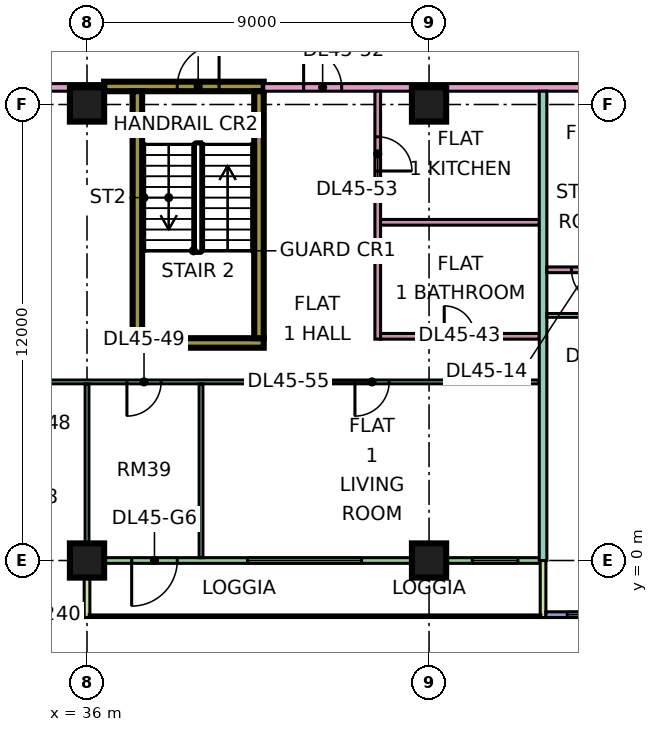
"""IFC4 building model, lengths in metres.
Left out: names, types, materials, properties, quantities, classifications, styles, units other than length and angle.
Written with IfcOpenShell. Run it as: python <this file> out.ifc"""

import sys

from ifc_helpers import new_model, si_unit, direction, frame, frame_2d, origin, origin_2d, place, context, subcontext, project, spatial, rectangle, extrude, element, fill, save


model = new_model("IFC4")
c1 = context("Model", 3, precision=1e-05, world=origin(), true_north=direction((0.0, 1.0)))
c2 = subcontext(c1, "Body", "Model", "MODEL_VIEW")
j1 = project(units=[si_unit("LENGTHUNIT", "METRE"), si_unit("PLANEANGLEUNIT", "RADIAN")], contexts=[c1])
p1 = place(None, origin())
s1 = spatial("IfcSite", under=j1, at=p1, CompositionType="ELEMENT")
p2 = place(p1, origin())
s2 = spatial("IfcBuilding", under=s1, at=p2, CompositionType="ELEMENT")
p3 = place(p2, frame((0.0, 0.0, 194.9)))
s3 = spatial("IfcBuildingStorey", under=s2, at=p3, CompositionType="ELEMENT", Elevation=194.9)
for number, where, z_axis, x_axis in (
    (1, (36.0, 0.0, 0.0), (0.0, 0.0, 1.0), (1.0, 0.0, 0.0)),
    (2, (36.0, 12.0, 0.0), (0.0, 0.0, 1.0), (1.0, 0.0, 0.0)),
    (3, (45.0, 0.0, 0.0), (0.0, 0.0, 1.0), (1.0, 0.0, 0.0)),
    (4, (45.0, 12.0, 0.0), (0.0, 0.0, 1.0), (1.0, 0.0, 0.0)),
):
    element("IfcColumn", number, at=place(p3, frame(where, z_axis=z_axis, x_axis=x_axis)), inside=s3, PredefinedType="COLUMN", context=c2, shape_type="SweptSolid", body=[
        extrude(rectangle(XDim=0.9, YDim=0.9, at=origin_2d()), origin(), (0.0, 0.0, 1.0), 3.75),
    ])
p4 = place(p3, frame((37.2, 5.725, 0.0), z_axis=(0.0, 0.0, 1.0), x_axis=(1.0, 0.0, 0.0)))
e5 = element("IfcWall", 5, at=p4, inside=s3, PredefinedType="SHEAR", context=c2, shape_type="SweptSolid", body=[
    extrude(rectangle(XDim=3.45, YDim=0.25, at=frame_2d((1.725, 0.0))), origin(), (0.0, 0.0, 1.0), 3.75),
])
p5 = place(p3, frame((36.45, 12.475, 0.0), z_axis=(0.0, 0.0, 1.0), x_axis=(1.0, 0.0, 0.0)))
e6 = element("IfcWall", 6, at=p5, inside=s3, PredefinedType="SHEAR", context=c2, shape_type="SweptSolid", body=[
    extrude(rectangle(XDim=4.2, YDim=0.25, at=frame_2d((2.1, 0.0))), origin(), (0.0, 0.0, 1.0), 3.75),
])
p6 = place(p5, frame((1.925, 0.0, 0.0)))
e7 = element("IfcOpeningElement", 7, at=p6, cuts=e6, PredefinedType="OPENING", context=c2, shape_type="SweptSolid", body=[
    extrude(rectangle(XDim=1.1, YDim=2.2, at=frame_2d((0.55, 1.1))), frame((0.0, 0.135, 0.0), z_axis=(0.0, -1.0, 0.0), x_axis=(1.0, 0.0, 0.0)), (0.0, 0.0, 1.0), 0.27),
])
for number, where, z_axis, x_axis in (
    (8, (37.325, 5.85, 0.0), (0.0, 0.0, 1.0), (0.0, 1.0, 0.0)),
    (9, (40.525, 5.85, 0.0), (0.0, 0.0, 1.0), (0.0, 1.0, 0.0)),
):
    element("IfcWall", number, at=place(p3, frame(where, z_axis=z_axis, x_axis=x_axis)), inside=s3, PredefinedType="SHEAR", context=c2, shape_type="SweptSolid", body=[
        extrude(rectangle(XDim=6.5, YDim=0.25, at=frame_2d((3.25, 0.0))), origin(), (0.0, 0.0, 1.0), 3.75),
    ])
p7 = place(p3, frame((24.075, -1.425, 0.0), z_axis=(0.0, 0.0, 1.0), x_axis=(1.0, 0.0, 0.0)))
e10 = element("IfcWall", 10, at=p7, inside=s3, PredefinedType="SOLIDWALL", context=c2, shape_type="SweptSolid", body=[
    extrude(rectangle(XDim=11.85, YDim=0.15, at=frame_2d((5.925, 0.0))), origin(), (0.0, 0.0, 1.0), 3.35),
])
p8 = place(p7, frame((0.562, 0.0, 0.45)))
e11 = element("IfcOpeningElement", 11, at=p8, cuts=e10, PredefinedType="OPENING", context=c2, shape_type="SweptSolid", body=[
    extrude(rectangle(XDim=1.8, YDim=2.4, at=frame_2d((0.9, 1.2))), frame((0.0, 0.085, 0.0), z_axis=(0.0, -1.0, 0.0), x_axis=(1.0, 0.0, 0.0)), (0.0, 0.0, 1.0), 0.17),
])
p9 = place(p7, frame((3.525, 0.0, 0.45)))
e12 = element("IfcOpeningElement", 12, at=p9, cuts=e10, PredefinedType="OPENING", context=c2, shape_type="SweptSolid", body=[
    extrude(rectangle(XDim=1.8, YDim=2.4, at=frame_2d((0.9, 1.2))), frame((0.0, 0.085, 0.0), z_axis=(0.0, -1.0, 0.0), x_axis=(1.0, 0.0, 0.0)), (0.0, 0.0, 1.0), 0.17),
])
p10 = place(p7, frame((6.525, 0.0, 0.45)))
e13 = element("IfcOpeningElement", 13, at=p10, cuts=e10, PredefinedType="OPENING", context=c2, shape_type="SweptSolid", body=[
    extrude(rectangle(XDim=1.8, YDim=2.4, at=frame_2d((0.9, 1.2))), frame((0.0, 0.085, 0.0), z_axis=(0.0, -1.0, 0.0), x_axis=(1.0, 0.0, 0.0)), (0.0, 0.0, 1.0), 0.17),
])
p11 = place(p7, frame((9.488, 0.0, 0.45)))
e14 = element("IfcOpeningElement", 14, at=p11, cuts=e10, PredefinedType="OPENING", context=c2, shape_type="SweptSolid", body=[
    extrude(rectangle(XDim=1.8, YDim=2.4, at=frame_2d((0.9, 1.2))), frame((0.0, 0.085, 0.0), z_axis=(0.0, -1.0, 0.0), x_axis=(1.0, 0.0, 0.0)), (0.0, 0.0, 1.0), 0.17),
])
p12 = place(p3, frame((36.075, 0.0, 0.0), z_axis=(0.0, 0.0, 1.0), x_axis=(1.0, 0.0, 0.0)))
e15 = element("IfcWall", 15, at=p12, inside=s3, PredefinedType="SOLIDWALL", context=c2, shape_type="SweptSolid", body=[
    extrude(rectangle(XDim=11.85, YDim=0.15, at=frame_2d((5.925, 0.0))), origin(), (0.0, 0.0, 1.0), 3.35),
])
p13 = place(p12, frame((1.1, 0.0, 0.0)))
e16 = element("IfcOpeningElement", 16, at=p13, cuts=e15, PredefinedType="OPENING", context=c2, shape_type="SweptSolid", body=[
    extrude(rectangle(XDim=1.2, YDim=2.4, at=frame_2d((0.6, 1.2))), frame((0.0, 0.085, 0.0), z_axis=(0.0, -1.0, 0.0), x_axis=(1.0, 0.0, 0.0)), (0.0, 0.0, 1.0), 0.17),
])
p14 = place(p12, frame((4.15, 0.0, 0.45)))
e17 = element("IfcOpeningElement", 17, at=p14, cuts=e15, PredefinedType="OPENING", context=c2, shape_type="SweptSolid", body=[
    extrude(rectangle(XDim=3.0, YDim=2.4, at=frame_2d((1.5, 1.2))), frame((0.0, 0.085, 0.0), z_axis=(0.0, -1.0, 0.0), x_axis=(1.0, 0.0, 0.0)), (0.0, 0.0, 1.0), 0.17),
])
p15 = place(p12, frame((10.062, 0.0, 0.45)))
e18 = element("IfcOpeningElement", 18, at=p15, cuts=e15, PredefinedType="OPENING", context=c2, shape_type="SweptSolid", body=[
    extrude(rectangle(XDim=1.2, YDim=2.4, at=frame_2d((0.6, 1.2))), frame((0.0, 0.085, 0.0), z_axis=(0.0, -1.0, 0.0), x_axis=(1.0, 0.0, 0.0)), (0.0, 0.0, 1.0), 0.17),
])
for number, where, z_axis, x_axis in (
    (19, (36.0, -1.5, 0.0), (0.0, 0.0, 1.0), (0.0, 1.0, 0.0)),
    (20, (48.0, -1.5, 0.0), (0.0, 0.0, 1.0), (0.0, 1.0, 0.0)),
):
    element("IfcWall", number, at=place(p3, frame(where, z_axis=z_axis, x_axis=x_axis)), inside=s3, PredefinedType="SOLIDWALL", context=c2, shape_type="SweptSolid", body=[
        extrude(rectangle(XDim=1.5, YDim=0.15, at=frame_2d((0.75, 0.0))), origin(), (0.0, 0.0, 1.0), 3.35),
    ])
p16 = place(p3, frame((48.075, -1.425, 0.0), z_axis=(0.0, 0.0, 1.0), x_axis=(1.0, 0.0, 0.0)))
e21 = element("IfcWall", 21, at=p16, inside=s3, PredefinedType="SOLIDWALL", context=c2, shape_type="SweptSolid", body=[
    extrude(rectangle(XDim=13.425, YDim=0.15, at=frame_2d((6.712, 0.0))), origin(), (0.0, 0.0, 1.0), 3.35),
])
p17 = place(p16, frame((0.562, 0.0, 0.45)))
e22 = element("IfcOpeningElement", 22, at=p17, cuts=e21, PredefinedType="OPENING", context=c2, shape_type="SweptSolid", body=[
    extrude(rectangle(XDim=1.8, YDim=2.4, at=frame_2d((0.9, 1.2))), frame((0.0, 0.085, 0.0), z_axis=(0.0, -1.0, 0.0), x_axis=(1.0, 0.0, 0.0)), (0.0, 0.0, 1.0), 0.17),
])
p18 = place(p16, frame((3.525, 0.0, 0.45)))
e23 = element("IfcOpeningElement", 23, at=p18, cuts=e21, PredefinedType="OPENING", context=c2, shape_type="SweptSolid", body=[
    extrude(rectangle(XDim=1.8, YDim=2.4, at=frame_2d((0.9, 1.2))), frame((0.0, 0.085, 0.0), z_axis=(0.0, -1.0, 0.0), x_axis=(1.0, 0.0, 0.0)), (0.0, 0.0, 1.0), 0.17),
])
p19 = place(p16, frame((6.525, 0.0, 0.45)))
e24 = element("IfcOpeningElement", 24, at=p19, cuts=e21, PredefinedType="OPENING", context=c2, shape_type="SweptSolid", body=[
    extrude(rectangle(XDim=1.8, YDim=2.4, at=frame_2d((0.9, 1.2))), frame((0.0, 0.085, 0.0), z_axis=(0.0, -1.0, 0.0), x_axis=(1.0, 0.0, 0.0)), (0.0, 0.0, 1.0), 0.17),
])
p20 = place(p16, frame((9.675, 0.0, 0.45)))
e25 = element("IfcOpeningElement", 25, at=p20, cuts=e21, PredefinedType="OPENING", context=c2, shape_type="SweptSolid", body=[
    extrude(rectangle(XDim=3.0, YDim=2.4, at=frame_2d((1.5, 1.2))), frame((0.0, 0.085, 0.0), z_axis=(0.0, -1.0, 0.0), x_axis=(1.0, 0.0, 0.0)), (0.0, 0.0, 1.0), 0.17),
])
p21 = place(p3, frame((33.05, 4.7, 0.0), z_axis=(0.0, 0.0, 1.0), x_axis=(1.0, 0.0, 0.0)))
e26 = element("IfcWall", 26, at=p21, inside=s3, PredefinedType="PARTITIONING", context=c2, shape_type="SweptSolid", body=[
    extrude(rectangle(XDim=14.85, YDim=0.1, at=frame_2d((7.425, 0.0))), origin(), (0.0, 0.0, 1.0), 3.35),
])
p22 = place(p21, frame((1.0, 0.0, 0.0)))
e27 = element("IfcOpeningElement", 27, at=p22, cuts=e26, PredefinedType="OPENING", context=c2, shape_type="SweptSolid", body=[
    extrude(rectangle(XDim=0.9, YDim=2.1, at=frame_2d((0.45, 1.05))), frame((0.0, 0.06, 0.0), z_axis=(0.0, -1.0, 0.0), x_axis=(1.0, 0.0, 0.0)), (0.0, 0.0, 1.0), 0.12),
])
p23 = place(p21, frame((4.0, 0.0, 0.0)))
e28 = element("IfcOpeningElement", 28, at=p23, cuts=e26, PredefinedType="OPENING", context=c2, shape_type="SweptSolid", body=[
    extrude(rectangle(XDim=0.9, YDim=2.1, at=frame_2d((0.45, 1.05))), frame((0.0, 0.06, 0.0), z_axis=(0.0, -1.0, 0.0), x_axis=(1.0, 0.0, 0.0)), (0.0, 0.0, 1.0), 0.12),
])
p24 = place(p21, frame((10.0, 0.0, 0.0)))
e29 = element("IfcOpeningElement", 29, at=p24, cuts=e26, PredefinedType="OPENING", context=c2, shape_type="SweptSolid", body=[
    extrude(rectangle(XDim=0.9, YDim=2.1, at=frame_2d((0.45, 1.05))), frame((0.0, 0.06, 0.0), z_axis=(0.0, -1.0, 0.0), x_axis=(1.0, 0.0, 0.0)), (0.0, 0.0, 1.0), 0.12),
])
p25 = place(p3, frame((34.0, 12.45, 0.0), z_axis=(0.0, 0.0, 1.0), x_axis=(1.0, 0.0, 0.0)))
e30 = element("IfcWall", 30, at=p25, inside=s3, PredefinedType="PARTITIONING", context=c2, shape_type="SweptSolid", body=[
    extrude(rectangle(XDim=2.451, YDim=0.2, at=frame_2d((1.226, 0.0))), origin(), (0.0, 0.0, 1.0), 3.35),
])
p26 = place(p3, frame((36.0, 0.0, 0.0), z_axis=(0.0, 0.0, 1.0), x_axis=(0.0, 1.0, 0.0)))
e31 = element("IfcWall", 31, at=p26, inside=s3, PredefinedType="PARTITIONING", context=c2, shape_type="SweptSolid", body=[
    extrude(rectangle(XDim=4.65, YDim=0.1, at=frame_2d((2.325, 0.0))), origin(), (0.0, 0.0, 1.0), 3.35),
])
p27 = place(p3, frame((39.0, 0.074, 0.0), z_axis=(0.0, 0.0, 1.0), x_axis=(0.0, 1.0, 0.0)))
e32 = element("IfcWall", 32, at=p27, inside=s3, PredefinedType="PARTITIONING", context=c2, shape_type="SweptSolid", body=[
    extrude(rectangle(XDim=4.576, YDim=0.1, at=frame_2d((2.288, 0.0))), origin(), (0.0, 0.0, 1.0), 3.35),
])
p28 = place(p3, frame((40.65, 12.45, 0.0), z_axis=(0.0, 0.0, 1.0), x_axis=(1.0, 0.0, 0.0)))
e33 = element("IfcWall", 33, at=p28, inside=s3, PredefinedType="PARTITIONING", context=c2, shape_type="SweptSolid", body=[
    extrude(rectangle(XDim=22.276, YDim=0.2, at=frame_2d((11.138, 0.0))), origin(), (0.0, 0.0, 1.0), 3.35),
])
p29 = place(p28, frame((20.55, 0.0, 0.0)))
e34 = element("IfcOpeningElement", 34, at=p29, cuts=e33, PredefinedType="OPENING", context=c2, shape_type="SweptSolid", body=[
    extrude(rectangle(XDim=1.0, YDim=2.1, at=frame_2d((0.5, 1.05))), frame((0.0, 0.11, 0.0), z_axis=(0.0, -1.0, 0.0), x_axis=(1.0, 0.0, 0.0)), (0.0, 0.0, 1.0), 0.22),
])
p30 = place(p28, frame((1.05, 0.0, 0.0)))
e35 = element("IfcOpeningElement", 35, at=p30, cuts=e33, PredefinedType="OPENING", context=c2, shape_type="SweptSolid", body=[
    extrude(rectangle(XDim=1.0, YDim=2.1, at=frame_2d((0.5, 1.05))), frame((0.0, 0.11, 0.0), z_axis=(0.0, -1.0, 0.0), x_axis=(1.0, 0.0, 0.0)), (0.0, 0.0, 1.0), 0.22),
])
p31 = place(p3, frame((43.65, 5.825, 0.0), z_axis=(0.0, 0.0, 1.0), x_axis=(0.0, 1.0, 0.0)))
e36 = element("IfcWall", 36, at=p31, inside=s3, PredefinedType="PARTITIONING", context=c2, shape_type="SweptSolid", body=[
    extrude(rectangle(XDim=6.525, YDim=0.15, at=frame_2d((3.263, 0.0))), origin(), (0.0, 0.0, 1.0), 3.35),
])
p32 = place(p31, frame((4.425, 0.0, 0.0)))
e37 = element("IfcOpeningElement", 37, at=p32, cuts=e36, PredefinedType="OPENING", context=c2, shape_type="SweptSolid", body=[
    extrude(rectangle(XDim=0.9, YDim=2.1, at=frame_2d((0.45, 1.05))), frame((0.0, 0.085, 0.0), z_axis=(0.0, -1.0, 0.0), x_axis=(1.0, 0.0, 0.0)), (0.0, 0.0, 1.0), 0.17),
])
p33 = place(p3, frame((43.725, 5.9, 0.0), z_axis=(0.0, 0.0, 1.0), x_axis=(1.0, 0.0, 0.0)))
e38 = element("IfcWall", 38, at=p33, inside=s3, PredefinedType="PARTITIONING", context=c2, shape_type="SweptSolid", body=[
    extrude(rectangle(XDim=4.175, YDim=0.15, at=frame_2d((2.087, 0.0))), origin(), (0.0, 0.0, 1.0), 3.35),
])
p34 = place(p33, frame((1.675, 0.0, 0.0)))
e39 = element("IfcOpeningElement", 39, at=p34, cuts=e38, PredefinedType="OPENING", context=c2, shape_type="SweptSolid", body=[
    extrude(rectangle(XDim=0.8, YDim=2.1, at=frame_2d((0.4, 1.05))), frame((0.0, 0.085, 0.0), z_axis=(0.0, -1.0, 0.0), x_axis=(1.0, 0.0, 0.0)), (0.0, 0.0, 1.0), 0.17),
])
p35 = place(p3, frame((43.725, 8.9, 0.0), z_axis=(0.0, 0.0, 1.0), x_axis=(1.0, 0.0, 0.0)))
e40 = element("IfcWall", 40, at=p35, inside=s3, PredefinedType="PARTITIONING", context=c2, shape_type="SweptSolid", body=[
    extrude(rectangle(XDim=4.175, YDim=0.15, at=frame_2d((2.087, 0.0))), origin(), (0.0, 0.0, 1.0), 3.35),
])
p36 = place(p3, frame((48.0, 0.0, 0.0), z_axis=(0.0, 0.0, 1.0), x_axis=(0.0, 1.0, 0.0)))
e41 = element("IfcWall", 41, at=p36, inside=s3, PredefinedType="PARTITIONING", context=c2, shape_type="SweptSolid", body=[
    extrude(rectangle(XDim=12.35, YDim=0.2, at=frame_2d((6.175, 0.0))), origin(), (0.0, 0.0, 1.0), 3.35),
])
p37 = place(p3, frame((48.1, 6.45, 0.0), z_axis=(0.0, 0.0, 1.0), x_axis=(1.0, 0.0, 0.0)))
e42 = element("IfcWall", 42, at=p37, inside=s3, PredefinedType="PARTITIONING", context=c2, shape_type="SweptSolid", body=[
    extrude(rectangle(XDim=8.95, YDim=0.1, at=frame_2d((4.475, 0.0))), origin(), (0.0, 0.0, 1.0), 3.35),
])
p38 = place(p37, frame((0.95, 0.0, 0.0)))
e43 = element("IfcOpeningElement", 43, at=p38, cuts=e42, PredefinedType="OPENING", context=c2, shape_type="SweptSolid", body=[
    extrude(rectangle(XDim=0.9, YDim=2.1, at=frame_2d((0.45, 1.05))), frame((0.0, 0.06, 0.0), z_axis=(0.0, -1.0, 0.0), x_axis=(1.0, 0.0, 0.0)), (0.0, 0.0, 1.0), 0.12),
])
p39 = place(p37, frame((3.95, 0.0, 0.0)))
e44 = element("IfcOpeningElement", 44, at=p39, cuts=e42, PredefinedType="OPENING", context=c2, shape_type="SweptSolid", body=[
    extrude(rectangle(XDim=0.9, YDim=2.1, at=frame_2d((0.45, 1.05))), frame((0.0, 0.06, 0.0), z_axis=(0.0, -1.0, 0.0), x_axis=(1.0, 0.0, 0.0)), (0.0, 0.0, 1.0), 0.12),
])
p40 = place(p37, frame((6.95, 0.0, 0.0)))
e45 = element("IfcOpeningElement", 45, at=p40, cuts=e42, PredefinedType="OPENING", context=c2, shape_type="SweptSolid", body=[
    extrude(rectangle(XDim=0.9, YDim=2.1, at=frame_2d((0.45, 1.05))), frame((0.0, 0.06, 0.0), z_axis=(0.0, -1.0, 0.0), x_axis=(1.0, 0.0, 0.0)), (0.0, 0.0, 1.0), 0.12),
])
p41 = place(p3, frame((48.1, 7.65, 0.0), z_axis=(0.0, 0.0, 1.0), x_axis=(1.0, 0.0, 0.0)))
e46 = element("IfcWall", 46, at=p41, inside=s3, PredefinedType="PARTITIONING", context=c2, shape_type="SweptSolid", body=[
    extrude(rectangle(XDim=12.25, YDim=0.15, at=frame_2d((6.125, 0.0))), origin(), (0.0, 0.0, 1.0), 3.35),
])
p42 = place(p41, frame((3.75, 0.0, 0.0)))
e47 = element("IfcOpeningElement", 47, at=p42, cuts=e46, PredefinedType="OPENING", context=c2, shape_type="SweptSolid", body=[
    extrude(rectangle(XDim=0.8, YDim=2.1, at=frame_2d((0.4, 1.05))), frame((0.0, 0.085, 0.0), z_axis=(0.0, -1.0, 0.0), x_axis=(1.0, 0.0, 0.0)), (0.0, 0.0, 1.0), 0.17),
])
p43 = place(p41, frame((0.65, 0.0, 0.0)))
e48 = element("IfcOpeningElement", 48, at=p43, cuts=e46, PredefinedType="OPENING", context=c2, shape_type="SweptSolid", body=[
    extrude(rectangle(XDim=0.9, YDim=2.1, at=frame_2d((0.45, 1.05))), frame((0.0, 0.085, 0.0), z_axis=(0.0, -1.0, 0.0), x_axis=(1.0, 0.0, 0.0)), (0.0, 0.0, 1.0), 0.17),
])
p44 = place(p11, origin())
e49 = element("IfcWindow", 49, at=p44, inside=s3, PartitioningType="SINGLE_PANEL", PredefinedType="WINDOW", context=c2, shape_type="SweptSolid", body=[
    extrude(rectangle(XDim=1.8, YDim=2.4, at=frame_2d((0.9, 1.2))), frame((0.0, 0.03, 0.0), z_axis=(0.0, -1.0, 0.0), x_axis=(1.0, 0.0, 0.0)), (0.0, 0.0, 1.0), 0.06),
])
fill(e14, e49)
p45 = place(p13, frame((1.2, 0.0, 0.0), z_axis=(0.0, 0.0, 1.0), x_axis=(-1.0, 0.0, 0.0)))
e50 = element("IfcDoor", 50, at=p45, inside=s3, OperationType="DOUBLE_DOOR_SINGLE_SWING", PredefinedType="DOOR", context=c2, shape_type="SweptSolid", body=[
    extrude(rectangle(XDim=1.2, YDim=2.4, at=frame_2d((0.6, 1.2))), frame((0.0, 0.025, 0.0), z_axis=(0.0, -1.0, 0.0), x_axis=(1.0, 0.0, 0.0)), (0.0, 0.0, 1.0), 0.05),
])
fill(e16, e50)
p46 = place(p14, origin())
e51 = element("IfcWindow", 51, at=p46, inside=s3, PartitioningType="SINGLE_PANEL", PredefinedType="WINDOW", context=c2, shape_type="SweptSolid", body=[
    extrude(rectangle(XDim=3.0, YDim=2.4, at=frame_2d((1.5, 1.2))), frame((0.0, 0.03, 0.0), z_axis=(0.0, -1.0, 0.0), x_axis=(1.0, 0.0, 0.0)), (0.0, 0.0, 1.0), 0.06),
])
fill(e17, e51)
p47 = place(p15, origin())
e52 = element("IfcWindow", 52, at=p47, inside=s3, PartitioningType="SINGLE_PANEL", PredefinedType="WINDOW", context=c2, shape_type="SweptSolid", body=[
    extrude(rectangle(XDim=1.2, YDim=2.4, at=frame_2d((0.6, 1.2))), frame((0.0, 0.03, 0.0), z_axis=(0.0, -1.0, 0.0), x_axis=(1.0, 0.0, 0.0)), (0.0, 0.0, 1.0), 0.06),
])
fill(e18, e52)
p48 = place(p17, origin())
e53 = element("IfcWindow", 53, at=p48, inside=s3, PartitioningType="SINGLE_PANEL", PredefinedType="WINDOW", context=c2, shape_type="SweptSolid", body=[
    extrude(rectangle(XDim=1.8, YDim=2.4, at=frame_2d((0.9, 1.2))), frame((0.0, 0.03, 0.0), z_axis=(0.0, -1.0, 0.0), x_axis=(1.0, 0.0, 0.0)), (0.0, 0.0, 1.0), 0.06),
])
fill(e22, e53)
p49 = place(p6, frame((1.1, 0.0, 0.0), z_axis=(0.0, 0.0, 1.0), x_axis=(-1.0, 0.0, 0.0)))
e54 = element("IfcDoor", 54, at=p49, inside=s3, OperationType="SINGLE_SWING_RIGHT", PredefinedType="DOOR", context=c2, shape_type="SweptSolid", body=[
    extrude(rectangle(XDim=1.1, YDim=2.2, at=frame_2d((0.55, 1.1))), frame((0.0, 0.025, 0.0), z_axis=(0.0, -1.0, 0.0), x_axis=(1.0, 0.0, 0.0)), (0.0, 0.0, 1.0), 0.05),
])
fill(e7, e54)
p50 = place(p43, origin())
e55 = element("IfcDoor", 55, at=p50, inside=s3, OperationType="SINGLE_SWING_RIGHT", PredefinedType="DOOR", context=c2, shape_type="SweptSolid", body=[
    extrude(rectangle(XDim=0.9, YDim=2.1, at=frame_2d((0.45, 1.05))), frame((0.0, 0.025, 0.0), z_axis=(0.0, -1.0, 0.0), x_axis=(1.0, 0.0, 0.0)), (0.0, 0.0, 1.0), 0.05),
])
fill(e48, e55)
p51 = place(p34, origin())
e56 = element("IfcDoor", 56, at=p51, inside=s3, OperationType="SINGLE_SWING_LEFT", PredefinedType="DOOR", context=c2, shape_type="SweptSolid", body=[
    extrude(rectangle(XDim=0.8, YDim=2.1, at=frame_2d((0.4, 1.05))), frame((0.0, 0.025, 0.0), z_axis=(0.0, -1.0, 0.0), x_axis=(1.0, 0.0, 0.0)), (0.0, 0.0, 1.0), 0.05),
])
fill(e39, e56)
p52 = place(p23, frame((0.9, 0.0, 0.0), z_axis=(0.0, 0.0, 1.0), x_axis=(-1.0, 0.0, 0.0)))
e57 = element("IfcDoor", 57, at=p52, inside=s3, OperationType="SINGLE_SWING_LEFT", PredefinedType="DOOR", context=c2, shape_type="SweptSolid", body=[
    extrude(rectangle(XDim=0.9, YDim=2.1, at=frame_2d((0.45, 1.05))), frame((0.0, 0.025, 0.0), z_axis=(0.0, -1.0, 0.0), x_axis=(1.0, 0.0, 0.0)), (0.0, 0.0, 1.0), 0.05),
])
fill(e28, e57)
p53 = place(p30, origin())
e58 = element("IfcDoor", 58, at=p53, inside=s3, OperationType="SINGLE_SWING_LEFT", PredefinedType="DOOR", context=c2, shape_type="SweptSolid", body=[
    extrude(rectangle(XDim=1.0, YDim=2.1, at=frame_2d((0.5, 1.05))), frame((0.0, 0.025, 0.0), z_axis=(0.0, -1.0, 0.0), x_axis=(1.0, 0.0, 0.0)), (0.0, 0.0, 1.0), 0.05),
])
fill(e35, e58)
p54 = place(p32, frame((0.9, 0.0, 0.0), z_axis=(0.0, 0.0, 1.0), x_axis=(-1.0, 0.0, 0.0)))
e59 = element("IfcDoor", 59, at=p54, inside=s3, OperationType="SINGLE_SWING_LEFT", PredefinedType="DOOR", context=c2, shape_type="SweptSolid", body=[
    extrude(rectangle(XDim=0.9, YDim=2.1, at=frame_2d((0.45, 1.05))), frame((0.0, 0.025, 0.0), z_axis=(0.0, -1.0, 0.0), x_axis=(1.0, 0.0, 0.0)), (0.0, 0.0, 1.0), 0.05),
])
fill(e37, e59)
p55 = place(p24, frame((0.9, 0.0, 0.0), z_axis=(0.0, 0.0, 1.0), x_axis=(-1.0, 0.0, 0.0)))
e60 = element("IfcDoor", 60, at=p55, inside=s3, OperationType="SINGLE_SWING_LEFT", PredefinedType="DOOR", context=c2, shape_type="SweptSolid", body=[
    extrude(rectangle(XDim=0.9, YDim=2.1, at=frame_2d((0.45, 1.05))), frame((0.0, 0.025, 0.0), z_axis=(0.0, -1.0, 0.0), x_axis=(1.0, 0.0, 0.0)), (0.0, 0.0, 1.0), 0.05),
])
fill(e29, e60)
save(model, sys.argv[1])
